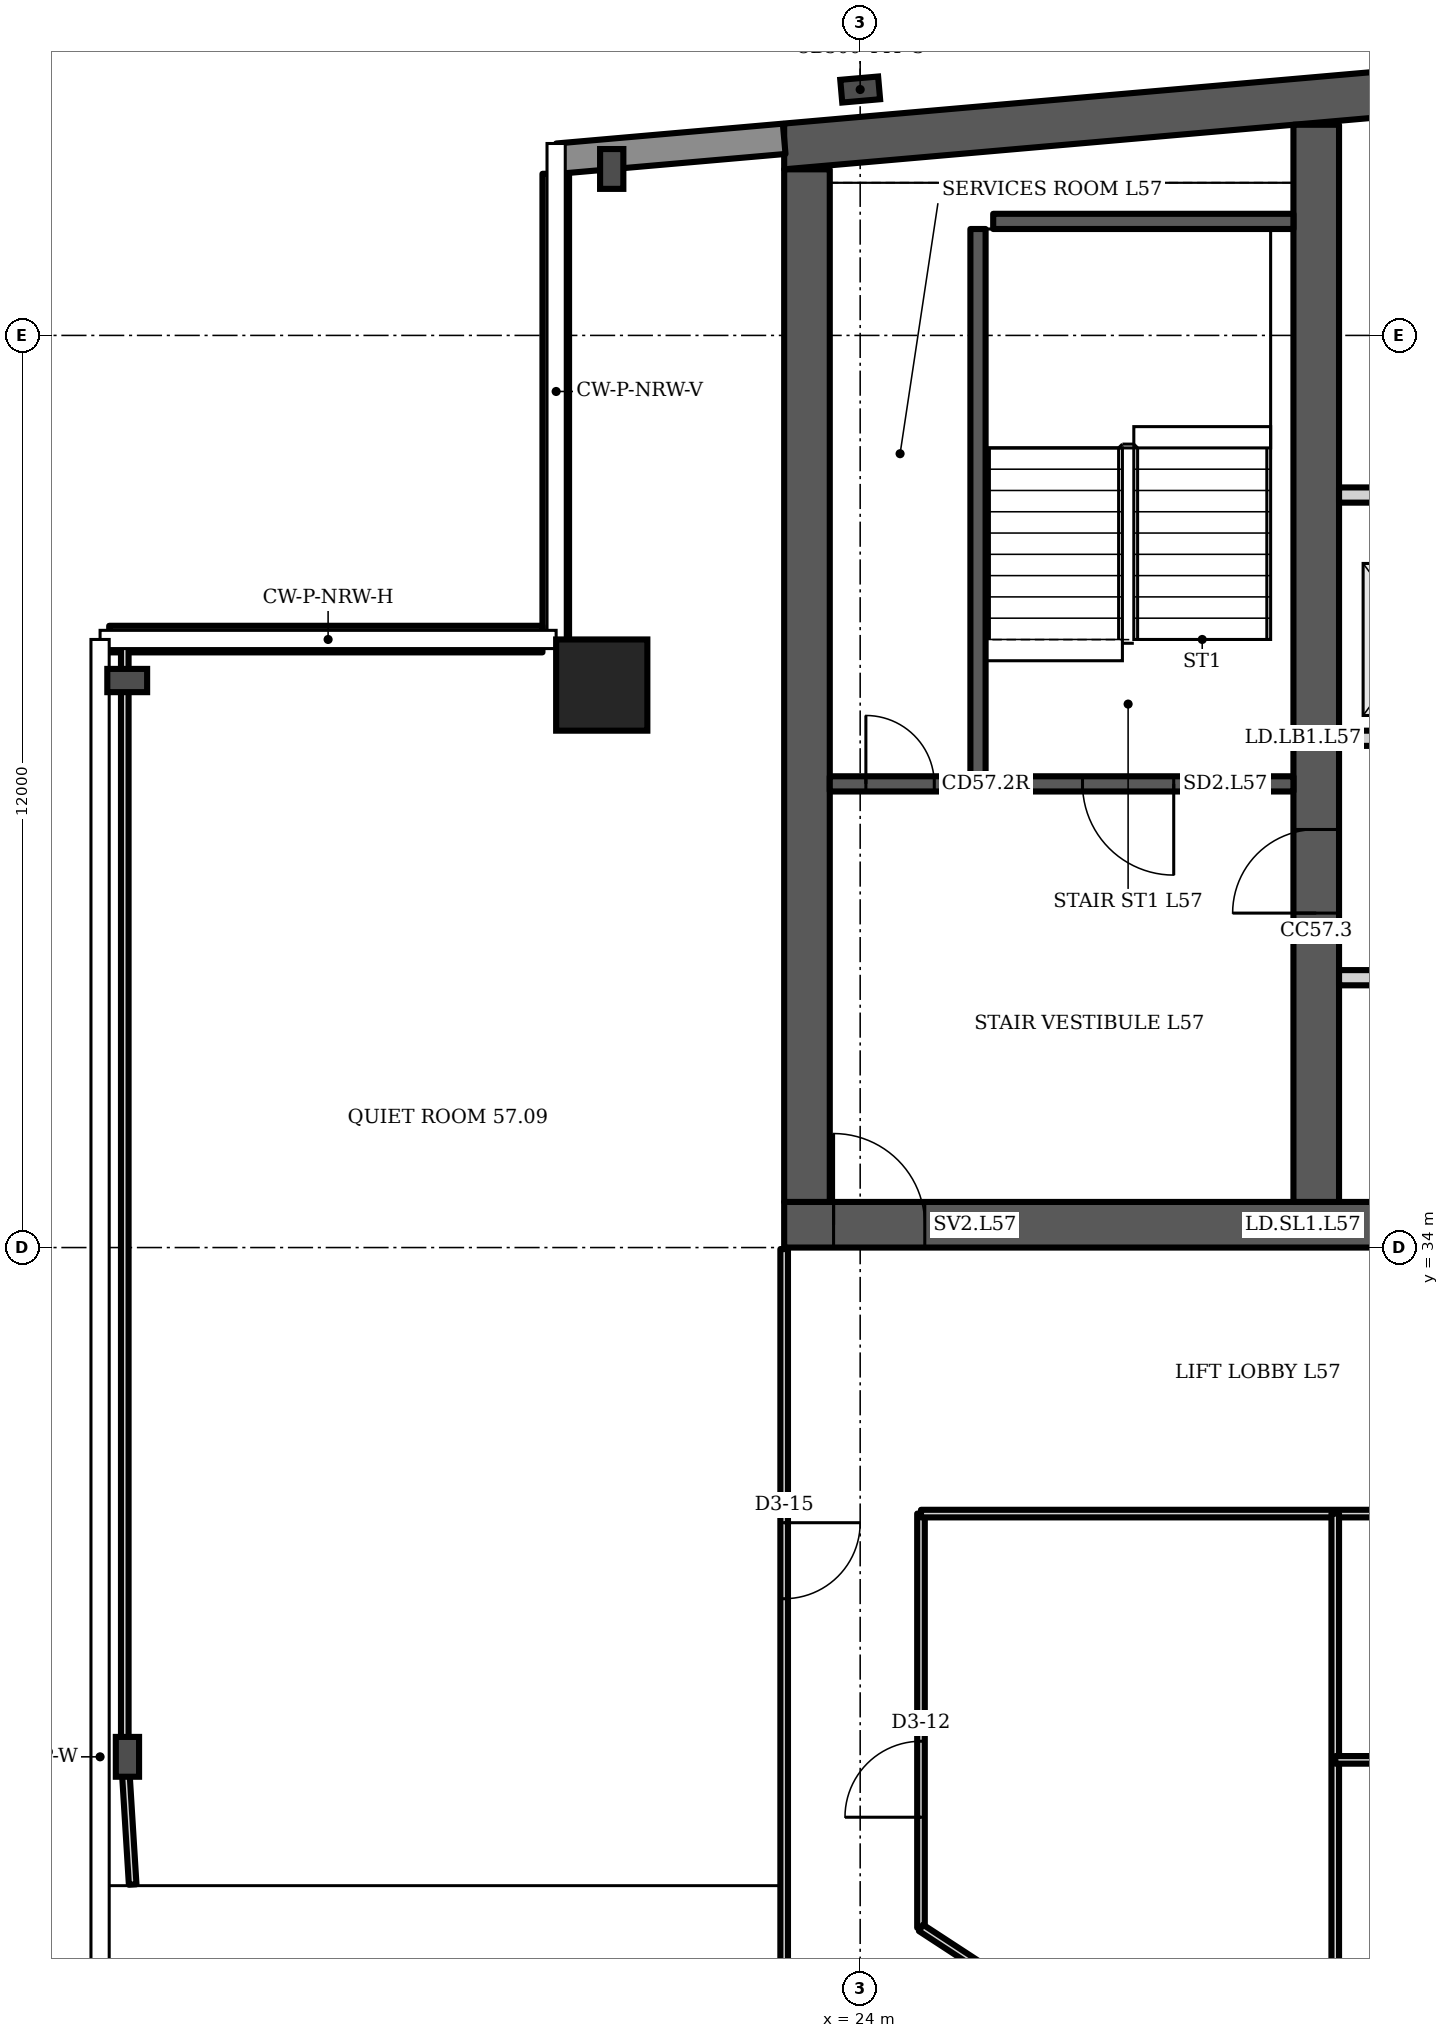
"""IFC4 building model, lengths in metres.
Left out: names, types, materials, properties, quantities, classifications, styles, units other than length and angle.
Written with IfcOpenShell. Run it as: python <this file> out.ifc"""

import sys

from ifc_helpers import new_model, si_unit, direction, frame, frame_2d, origin, origin_2d, place, context, subcontext, project, spatial, polyline, rectangle, i_section, outline, extrude, element, fill, save


model = new_model("IFC4")
c1 = context("Model", 3, precision=1e-05, world=origin(), true_north=direction((0.0, 1.0)))
c2 = subcontext(c1, "Body", "Model", "MODEL_VIEW")
j1 = project(units=[si_unit("LENGTHUNIT", "METRE"), si_unit("PLANEANGLEUNIT", "RADIAN")], contexts=[c1])
p1 = place(None, origin())
s1 = spatial("IfcSite", under=j1, at=p1, CompositionType="ELEMENT")
p2 = place(p1, origin())
s2 = spatial("IfcBuilding", under=s1, at=p2, CompositionType="ELEMENT")
p3 = place(p2, frame((0.0, 0.0, 228.7)))
s3 = spatial("IfcBuildingStorey", under=s2, at=p3, CompositionType="ELEMENT", Elevation=228.7)
p4 = place(p3, origin())
e1 = element("IfcWall", 1, at=p4, inside=s3, PredefinedType="SHEAR", context=c2, shape_type="SweptSolid", body=[
    extrude(outline(polyline([(23.0, 48.185), (40.5, 49.716), (58.0, 48.185), (58.0, 48.787), (40.5, 50.318), (23.0, 48.787), (23.0, 48.185)])), origin(), (0.0, 0.0, 1.0), 3.6),
])
p5 = place(p3, frame((23.0, 34.3, 0.0), z_axis=(0.0, 0.0, 1.0), x_axis=(1.0, 0.0, 0.0)))
e2 = element("IfcWall", 2, at=p5, inside=s3, PredefinedType="SHEAR", context=c2, shape_type="SweptSolid", body=[
    extrude(rectangle(XDim=35.0, YDim=0.6, at=frame_2d((17.5, 0.0))), origin(), (0.0, 0.0, 1.0), 3.6),
])
p6 = place(p5, frame((0.65, 0.0, 0.0)))
e3 = element("IfcOpeningElement", 3, at=p6, cuts=e2, PredefinedType="OPENING", context=c2, shape_type="SweptSolid", body=[
    extrude(rectangle(XDim=1.2, YDim=2.1, at=frame_2d((0.6, 1.05))), frame((0.0, 0.31, 0.0), z_axis=(0.0, -1.0, 0.0), x_axis=(1.0, 0.0, 0.0)), (0.0, 0.0, 1.0), 0.62),
])
p7 = place(p5, frame((7.717, 0.0, 0.0)))
e4 = element("IfcOpeningElement", 4, at=p7, cuts=e2, PredefinedType="OPENING", context=c2, shape_type="SweptSolid", body=[
    extrude(rectangle(XDim=1.1, YDim=2.1, at=frame_2d((0.55, 1.05))), frame((0.0, 0.31, 0.0), z_axis=(0.0, -1.0, 0.0), x_axis=(1.0, 0.0, 0.0)), (0.0, 0.0, 1.0), 0.62),
])
p8 = place(p5, frame((12.183, 0.0, 0.0)))
e5 = element("IfcOpeningElement", 5, at=p8, cuts=e2, PredefinedType="OPENING", context=c2, shape_type="SweptSolid", body=[
    extrude(rectangle(XDim=1.1, YDim=2.1, at=frame_2d((0.55, 1.05))), frame((0.0, 0.31, 0.0), z_axis=(0.0, -1.0, 0.0), x_axis=(1.0, 0.0, 0.0)), (0.0, 0.0, 1.0), 0.62),
])
p9 = place(p5, frame((9.8, 0.0, 0.0)))
e6 = element("IfcOpeningElement", 6, at=p9, cuts=e2, PredefinedType="OPENING", context=c2, shape_type="SweptSolid", body=[
    extrude(rectangle(XDim=1.4, YDim=2.1, at=frame_2d((0.7, 1.05))), frame((0.0, 0.31, 0.0), z_axis=(0.0, -1.0, 0.0), x_axis=(1.0, 0.0, 0.0)), (0.0, 0.0, 1.0), 0.62),
])
p10 = place(p5, frame((14.717, 0.0, 0.0)))
e7 = element("IfcOpeningElement", 7, at=p10, cuts=e2, PredefinedType="OPENING", context=c2, shape_type="SweptSolid", body=[
    extrude(rectangle(XDim=1.1, YDim=2.1, at=frame_2d((0.55, 1.05))), frame((0.0, 0.31, 0.0), z_axis=(0.0, -1.0, 0.0), x_axis=(1.0, 0.0, 0.0)), (0.0, 0.0, 1.0), 0.62),
])
p11 = place(p5, frame((16.95, 0.0, 0.0)))
e8 = element("IfcOpeningElement", 8, at=p11, cuts=e2, PredefinedType="OPENING", context=c2, shape_type="SweptSolid", body=[
    extrude(rectangle(XDim=1.1, YDim=2.1, at=frame_2d((0.55, 1.05))), frame((0.0, 0.31, 0.0), z_axis=(0.0, -1.0, 0.0), x_axis=(1.0, 0.0, 0.0)), (0.0, 0.0, 1.0), 0.62),
])
p12 = place(p5, frame((19.183, 0.0, 0.0)))
e9 = element("IfcOpeningElement", 9, at=p12, cuts=e2, PredefinedType="OPENING", context=c2, shape_type="SweptSolid", body=[
    extrude(rectangle(XDim=1.1, YDim=2.1, at=frame_2d((0.55, 1.05))), frame((0.0, 0.31, 0.0), z_axis=(0.0, -1.0, 0.0), x_axis=(1.0, 0.0, 0.0)), (0.0, 0.0, 1.0), 0.62),
])
p13 = place(p5, frame((26.15, 0.0, 0.0)))
e10 = element("IfcOpeningElement", 10, at=p13, cuts=e2, PredefinedType="OPENING", context=c2, shape_type="SweptSolid", body=[
    extrude(rectangle(XDim=1.2, YDim=2.1, at=frame_2d((0.6, 1.05))), frame((0.0, 0.31, 0.0), z_axis=(0.0, -1.0, 0.0), x_axis=(1.0, 0.0, 0.0)), (0.0, 0.0, 1.0), 0.62),
])
p14 = place(p5, frame((28.767, 0.0, 0.0)))
e11 = element("IfcOpeningElement", 11, at=p14, cuts=e2, PredefinedType="OPENING", context=c2, shape_type="SweptSolid", body=[
    extrude(rectangle(XDim=1.0, YDim=2.1, at=frame_2d((0.5, 1.05))), frame((0.0, 0.31, 0.0), z_axis=(0.0, -1.0, 0.0), x_axis=(1.0, 0.0, 0.0)), (0.0, 0.0, 1.0), 0.62),
])
p15 = place(p5, frame((33.083, 0.0, 0.0)))
e12 = element("IfcOpeningElement", 12, at=p15, cuts=e2, PredefinedType="OPENING", context=c2, shape_type="SweptSolid", body=[
    extrude(rectangle(XDim=1.0, YDim=2.1, at=frame_2d((0.5, 1.05))), frame((0.0, 0.31, 0.0), z_axis=(0.0, -1.0, 0.0), x_axis=(1.0, 0.0, 0.0)), (0.0, 0.0, 1.0), 0.62),
])
p16 = place(p5, frame((30.8, 0.0, 0.0)))
e13 = element("IfcOpeningElement", 13, at=p16, cuts=e2, PredefinedType="OPENING", context=c2, shape_type="SweptSolid", body=[
    extrude(rectangle(XDim=1.4, YDim=2.1, at=frame_2d((0.7, 1.05))), frame((0.0, 0.31, 0.0), z_axis=(0.0, -1.0, 0.0), x_axis=(1.0, 0.0, 0.0)), (0.0, 0.0, 1.0), 0.62),
])
p17 = place(p3, frame((23.3, 34.6, 0.0), z_axis=(0.0, 0.0, 1.0), x_axis=(0.0, 1.0, 0.0)))
e14 = element("IfcWall", 14, at=p17, inside=s3, PredefinedType="SHEAR", context=c2, shape_type="SweptSolid", body=[
    extrude(rectangle(XDim=13.585, YDim=0.6, at=frame_2d((6.792, 0.0))), origin(), (0.0, 0.0, 1.0), 3.6),
])
p18 = place(p3, frame((30.0, 34.6, 0.0), z_axis=(0.0, 0.0, 1.0), x_axis=(0.0, 1.0, 0.0)))
e15 = element("IfcWall", 15, at=p18, inside=s3, PredefinedType="SHEAR", context=c2, shape_type="SweptSolid", body=[
    extrude(rectangle(XDim=14.171, YDim=0.6, at=frame_2d((7.085, 0.0))), origin(), (0.0, 0.0, 1.0), 3.6),
])
p19 = place(p18, frame((3.8, 0.0, 0.0)))
e16 = element("IfcOpeningElement", 16, at=p19, cuts=e15, PredefinedType="OPENING", context=c2, shape_type="SweptSolid", body=[
    extrude(rectangle(XDim=1.1, YDim=2.1, at=frame_2d((0.55, 1.05))), frame((0.0, 0.31, 0.0), z_axis=(0.0, -1.0, 0.0), x_axis=(1.0, 0.0, 0.0)), (0.0, 0.0, 1.0), 0.62),
])
p20 = place(p3, frame((20.6, 41.4, 0.0), z_axis=(0.0, 0.0, 1.0), x_axis=(1.0, 0.0, 0.0)))
e17 = element("IfcColumn", 17, at=p20, inside=s3, PredefinedType="COLUMN", context=c2, shape_type="SweptSolid", body=[
    extrude(rectangle(XDim=1.2, YDim=1.2, at=origin_2d()), origin(), (0.0, 0.0, 1.0), 3.6),
])
for number, where, z_axis, x_axis in (
    (18, (20.731, 48.19, 0.0), (0.0, 0.0, 1.0), (-1.0, 0.0, 0.0)),
    (19, (14.357, 41.46, 0.0), (0.0, 0.0, 1.0), (0.0, 1.0, 0.0)),
    (20, (14.36, 27.3, 0.0), (0.0, 0.0, 1.0), (-1.0, 0.0, 0.0)),
):
    element("IfcColumn", number, at=place(p3, frame(where, z_axis=z_axis, x_axis=x_axis)), inside=s3, PredefinedType="COLUMN", context=c2, shape_type="SweptSolid", body=[
        extrude(i_section(OverallWidth=0.306, OverallDepth=0.524, WebThickness=0.021, FlangeThickness=0.04, FilletRadius=0.027, at=origin_2d()), origin(), (0.0, 0.0, 1.0), 3.6),
    ])
p21 = place(p3, frame((24.0, 49.235, 0.0), z_axis=(0.0, 0.0, 1.0), x_axis=(-0.087156, 0.996197, 0.0)))
e21 = element("IfcColumn", 21, at=p21, inside=s3, PredefinedType="COLUMN", context=c2, shape_type="SweptSolid", body=[
    extrude(i_section(OverallWidth=0.3, OverallDepth=0.5, WebThickness=0.014, FlangeThickness=0.028, FilletRadius=0.027, at=origin_2d()), origin(), (0.0, 0.0, 1.0), 3.6),
])
p22 = place(p3, frame((23.0, 48.587, 0.0), z_axis=(0.0, 0.0, 1.0), x_axis=(-0.996194, -0.087168, 0.0)))
e22 = element("IfcWall", 22, at=p22, inside=s3, PredefinedType="SOLIDWALL", context=c2, shape_type="SweptSolid", body=[
    extrude(rectangle(XDim=2.994, YDim=0.4, at=frame_2d((1.497, 0.0))), origin(), (0.0, 0.0, 1.0), 3.2),
])
p23 = place(p3, frame((19.995, 48.126, 0.0), z_axis=(0.0, 0.0, 1.0), x_axis=(0.0, -1.0, 0.0)))
e23 = element("IfcWall", 23, at=p23, inside=s3, PredefinedType="SOLIDWALL", context=c2, shape_type="SweptSolid", body=[
    extrude(rectangle(XDim=6.126, YDim=0.35, at=frame_2d((3.063, 0.0))), origin(), (0.0, 0.0, 1.0), 1.0),
])
p24 = place(p3, frame((19.82, 42.005, 0.0), z_axis=(0.0, 0.0, 1.0), x_axis=(-1.0, 0.0, 0.0)))
e24 = element("IfcWall", 24, at=p24, inside=s3, PredefinedType="SOLIDWALL", context=c2, shape_type="SweptSolid", body=[
    extrude(rectangle(XDim=5.7, YDim=0.35, at=frame_2d((2.85, 0.0))), origin(), (0.0, 0.0, 1.0), 1.0),
])
p25 = place(p3, frame((23.6, 40.1, 0.0), z_axis=(0.0, 0.0, 1.0), x_axis=(1.0, 0.0, 0.0)))
e25 = element("IfcWall", 25, at=p25, inside=s3, PredefinedType="SHEAR", context=c2, shape_type="SweptSolid", body=[
    extrude(rectangle(XDim=6.1, YDim=0.2, at=frame_2d((3.05, 0.0))), origin(), (0.0, 0.0, 1.0), 3.2),
])
p26 = place(p25, frame((3.325, 0.0, 0.0)))
e26 = element("IfcOpeningElement", 26, at=p26, cuts=e25, PredefinedType="OPENING", context=c2, shape_type="SweptSolid", body=[
    extrude(rectangle(XDim=1.2, YDim=2.1, at=frame_2d((0.6, 1.05))), frame((0.0, 0.11, 0.0), z_axis=(0.0, -1.0, 0.0), x_axis=(1.0, 0.0, 0.0)), (0.0, 0.0, 1.0), 0.22),
])
p27 = place(p25, frame((0.475, 0.0, 0.0)))
e27 = element("IfcOpeningElement", 27, at=p27, cuts=e25, PredefinedType="OPENING", context=c2, shape_type="SweptSolid", body=[
    extrude(rectangle(XDim=0.9, YDim=2.1, at=frame_2d((0.45, 1.05))), frame((0.0, 0.11, 0.0), z_axis=(0.0, -1.0, 0.0), x_axis=(1.0, 0.0, 0.0)), (0.0, 0.0, 1.0), 0.22),
])
p28 = place(p3, frame((25.55, 40.2, 0.0), z_axis=(0.0, 0.0, 1.0), x_axis=(0.0, 1.0, 0.0)))
e28 = element("IfcWall", 28, at=p28, inside=s3, PredefinedType="SHEAR", context=c2, shape_type="SweptSolid", body=[
    extrude(rectangle(XDim=7.2, YDim=0.2, at=frame_2d((3.6, 0.0))), origin(), (0.0, 0.0, 1.0), 3.2),
])
p29 = place(p3, frame((25.75, 47.5, 0.0), z_axis=(0.0, 0.0, 1.0), x_axis=(1.0, 0.0, 0.0)))
e29 = element("IfcWall", 29, at=p29, inside=s3, PredefinedType="SHEAR", context=c2, shape_type="SweptSolid", body=[
    extrude(rectangle(XDim=3.95, YDim=0.2, at=frame_2d((1.975, 0.0))), origin(), (0.0, 0.0, 1.0), 3.2),
])
p30 = place(p3, frame((30.3, 40.7, 0.0), z_axis=(0.0, 0.0, 1.0), x_axis=(1.0, 0.0, 0.0)))
e30 = element("IfcWall", 30, at=p30, inside=s3, PredefinedType="PARTITIONING", context=c2, shape_type="SweptSolid", body=[
    extrude(rectangle(XDim=6.4, YDim=0.2, at=frame_2d((3.2, 0.0))), origin(), (0.0, 0.0, 1.0), 3.2),
])
p31 = place(p30, frame((0.417, 0.0, 0.0)))
e31 = element("IfcOpeningElement", 31, at=p31, cuts=e30, PredefinedType="OPENING", context=c2, shape_type="SweptSolid", body=[
    extrude(rectangle(XDim=1.1, YDim=2.1, at=frame_2d((0.55, 1.05))), frame((0.0, 0.11, 0.0), z_axis=(0.0, -1.0, 0.0), x_axis=(1.0, 0.0, 0.0)), (0.0, 0.0, 1.0), 0.22),
])
p32 = place(p30, frame((2.65, 0.0, 0.0)))
e32 = element("IfcOpeningElement", 32, at=p32, cuts=e30, PredefinedType="OPENING", context=c2, shape_type="SweptSolid", body=[
    extrude(rectangle(XDim=1.1, YDim=2.1, at=frame_2d((0.55, 1.05))), frame((0.0, 0.11, 0.0), z_axis=(0.0, -1.0, 0.0), x_axis=(1.0, 0.0, 0.0)), (0.0, 0.0, 1.0), 0.22),
])
p33 = place(p30, frame((4.883, 0.0, 0.0)))
e33 = element("IfcOpeningElement", 33, at=p33, cuts=e30, PredefinedType="OPENING", context=c2, shape_type="SweptSolid", body=[
    extrude(rectangle(XDim=1.1, YDim=2.1, at=frame_2d((0.55, 1.05))), frame((0.0, 0.11, 0.0), z_axis=(0.0, -1.0, 0.0), x_axis=(1.0, 0.0, 0.0)), (0.0, 0.0, 1.0), 0.22),
])
p34 = place(p3, frame((0.0, 0.0, -0.0)))
e34 = element("IfcWall", 34, at=p34, inside=s3, PredefinedType="PARTITIONING", context=c2, shape_type="SweptSolid", body=[
    extrude(outline(polyline([(32.233, 37.45), (30.3, 37.45), (30.3, 37.65), (32.233, 37.65), (32.433, 37.65), (32.433, 34.6), (32.233, 34.6), (32.233, 37.45)])), origin(), (0.0, 0.0, 1.0), 3.2),
])
p35 = place(p3, frame((0.0, 0.0, -0.0)))
e35 = element("IfcWall", 35, at=p35, inside=s3, PredefinedType="PARTITIONING", context=c2, shape_type="SweptSolid", body=[
    extrude(outline(polyline([(32.433, 40.8), (32.233, 40.8), (32.233, 43.8), (30.3, 43.8), (30.3, 44.0), (36.7, 44.0), (36.7, 43.8), (34.767, 43.8), (34.767, 40.8), (34.567, 40.8), (34.567, 43.8), (32.433, 43.8), (32.433, 40.8)])), origin(), (0.0, 0.0, 1.0), 3.2),
])
p36 = place(p3, frame((14.325, 27.3, 0.0), z_axis=(0.0, 0.0, 1.0), x_axis=(0.0, 1.0, 0.0)))
e36 = element("IfcWall", 36, at=p36, inside=s3, PredefinedType="PARTITIONING", context=c2, shape_type="SweptSolid", body=[
    extrude(rectangle(XDim=14.68, YDim=0.1, at=frame_2d((7.34, 0.0))), origin(), (0.0, 0.0, 1.0), 2.58),
])
p37 = place(p3, frame((14.429, 25.62, 0.0), z_axis=(0.0, 0.0, 1.0), x_axis=(-0.061647, 0.998101, 0.0)))
e37 = element("IfcWall", 37, at=p37, inside=s3, PredefinedType="PARTITIONING", context=c2, shape_type="SweptSolid", body=[
    extrude(rectangle(XDim=1.683, YDim=0.1, at=frame_2d((0.842, 0.0))), origin(), (0.0, 0.0, 1.0), 2.58),
])
p38 = place(p3, frame((23.0, 24.275, 0.0), z_axis=(0.0, 0.0, 1.0), x_axis=(0.0, 1.0, 0.0)))
e38 = element("IfcWall", 38, at=p38, inside=s3, PredefinedType="PARTITIONING", context=c2, shape_type="SweptSolid", body=[
    extrude(rectangle(XDim=9.705, YDim=0.1, at=frame_2d((4.853, 0.0))), origin(), (0.0, 0.0, 1.0), 3.2),
])
p39 = place(p38, frame((5.105, 0.0, 0.0)))
e39 = element("IfcOpeningElement", 39, at=p39, cuts=e38, PredefinedType="OPENING", context=c2, shape_type="SweptSolid", body=[
    extrude(rectangle(XDim=1.0, YDim=2.1, at=frame_2d((0.5, 1.05))), frame((0.0, 0.06, 0.0), z_axis=(0.0, -1.0, 0.0), x_axis=(1.0, 0.0, 0.0)), (0.0, 0.0, 1.0), 0.12),
])
p40 = place(p3, frame((24.8, 25.05, 0.0), z_axis=(0.0, 0.0, 1.0), x_axis=(0.0, 1.0, 0.0)))
e40 = element("IfcWall", 40, at=p40, inside=s3, PredefinedType="PARTITIONING", context=c2, shape_type="SweptSolid", body=[
    extrude(rectangle(XDim=5.45, YDim=0.1, at=frame_2d((2.725, 0.0))), origin(), (0.0, 0.0, 1.0), 3.2),
])
p41 = place(p40, frame((1.455, 0.0, 0.0)))
e41 = element("IfcOpeningElement", 41, at=p41, cuts=e40, PredefinedType="OPENING", context=c2, shape_type="SweptSolid", body=[
    extrude(rectangle(XDim=1.0, YDim=2.1, at=frame_2d((0.5, 1.05))), frame((0.0, 0.06, 0.0), z_axis=(0.0, -1.0, 0.0), x_axis=(1.0, 0.0, 0.0)), (0.0, 0.0, 1.0), 0.12),
])
p42 = place(p3, frame((24.8, 30.5, 0.0), z_axis=(0.0, 0.0, 1.0), x_axis=(1.0, 0.0, 0.0)))
e42 = element("IfcWall", 42, at=p42, inside=s3, PredefinedType="PARTITIONING", context=c2, shape_type="SweptSolid", body=[
    extrude(rectangle(XDim=12.05, YDim=0.1, at=frame_2d((6.025, 0.0))), origin(), (0.0, 0.0, 1.0), 3.2),
])
p43 = place(p3, frame((26.025, 24.25, 0.0), z_axis=(0.0, 0.0, 1.0), x_axis=(-0.837222, 0.546856, 0.0)))
e43 = element("IfcWall", 43, at=p43, inside=s3, PredefinedType="PARTITIONING", context=c2, shape_type="SweptSolid", body=[
    extrude(rectangle(XDim=1.463, YDim=0.1, at=frame_2d((0.731, 0.0))), origin(), (0.0, 0.0, 1.0), 3.2),
])
p44 = place(p3, frame((30.25, 17.0, 0.0), z_axis=(0.0, 0.0, 1.0), x_axis=(0.0, 1.0, 0.0)))
e44 = element("IfcWall", 44, at=p44, inside=s3, PredefinedType="PARTITIONING", context=c2, shape_type="SweptSolid", body=[
    extrude(rectangle(XDim=13.5, YDim=0.1, at=frame_2d((6.75, 0.0))), origin(), (0.0, 0.0, 1.0), 3.2),
])
p45 = place(p3, frame((30.25, 27.26, 0.0), z_axis=(0.0, 0.0, 1.0), x_axis=(1.0, 0.0, 0.0)))
e45 = element("IfcWall", 45, at=p45, inside=s3, PredefinedType="PARTITIONING", context=c2, shape_type="SweptSolid", body=[
    extrude(rectangle(XDim=5.19, YDim=0.1, at=frame_2d((2.595, 0.0))), origin(), (0.0, 0.0, 1.0), 3.2),
])
p46 = place(p26, origin())
e46 = element("IfcDoor", 46, at=p46, inside=s3, OperationType="SINGLE_SWING_RIGHT", PredefinedType="DOOR", context=c2, shape_type="SweptSolid", body=[
    extrude(rectangle(XDim=1.2, YDim=2.1, at=frame_2d((0.6, 1.05))), frame((0.0, 0.025, 0.0), z_axis=(0.0, -1.0, 0.0), x_axis=(1.0, 0.0, 0.0)), (0.0, 0.0, 1.0), 0.05),
])
fill(e26, e46)
p47 = place(p27, origin())
e47 = element("IfcDoor", 47, at=p47, inside=s3, OperationType="SINGLE_SWING_LEFT", PredefinedType="DOOR", context=c2, shape_type="SweptSolid", body=[
    extrude(rectangle(XDim=0.9, YDim=2.1, at=frame_2d((0.45, 1.05))), frame((0.0, 0.025, 0.0), z_axis=(0.0, -1.0, 0.0), x_axis=(1.0, 0.0, 0.0)), (0.0, 0.0, 1.0), 0.05),
])
fill(e27, e47)
p48 = place(p6, origin())
e48 = element("IfcDoor", 48, at=p48, inside=s3, OperationType="SINGLE_SWING_LEFT", PredefinedType="DOOR", context=c2, shape_type="SweptSolid", body=[
    extrude(rectangle(XDim=1.2, YDim=2.1, at=frame_2d((0.6, 1.05))), frame((0.0, 0.025, 0.0), z_axis=(0.0, -1.0, 0.0), x_axis=(1.0, 0.0, 0.0)), (0.0, 0.0, 1.0), 0.05),
])
fill(e3, e48)
p49 = place(p19, origin())
e49 = element("IfcDoor", 49, at=p49, inside=s3, OperationType="SINGLE_SWING_LEFT", PredefinedType="DOOR", context=c2, shape_type="SweptSolid", body=[
    extrude(rectangle(XDim=1.1, YDim=2.1, at=frame_2d((0.55, 1.05))), frame((0.0, 0.025, 0.0), z_axis=(0.0, -1.0, 0.0), x_axis=(1.0, 0.0, 0.0)), (0.0, 0.0, 1.0), 0.05),
])
fill(e16, e49)
p50 = place(p41, origin())
e50 = element("IfcDoor", 50, at=p50, inside=s3, OperationType="SINGLE_SWING_LEFT", PredefinedType="DOOR", context=c2, shape_type="SweptSolid", body=[
    extrude(rectangle(XDim=1.0, YDim=2.1, at=frame_2d((0.5, 1.05))), frame((0.0, 0.025, 0.0), z_axis=(0.0, -1.0, 0.0), x_axis=(1.0, 0.0, 0.0)), (0.0, 0.0, 1.0), 0.05),
])
fill(e41, e50)
p51 = place(p39, origin())
e51 = element("IfcDoor", 51, at=p51, inside=s3, OperationType="SINGLE_SWING_RIGHT", PredefinedType="DOOR", context=c2, shape_type="SweptSolid", body=[
    extrude(rectangle(XDim=1.0, YDim=2.1, at=frame_2d((0.5, 1.05))), frame((0.0, 0.025, 0.0), z_axis=(0.0, -1.0, 0.0), x_axis=(1.0, 0.0, 0.0)), (0.0, 0.0, 1.0), 0.05),
])
fill(e39, e51)
save(model, sys.argv[1])
